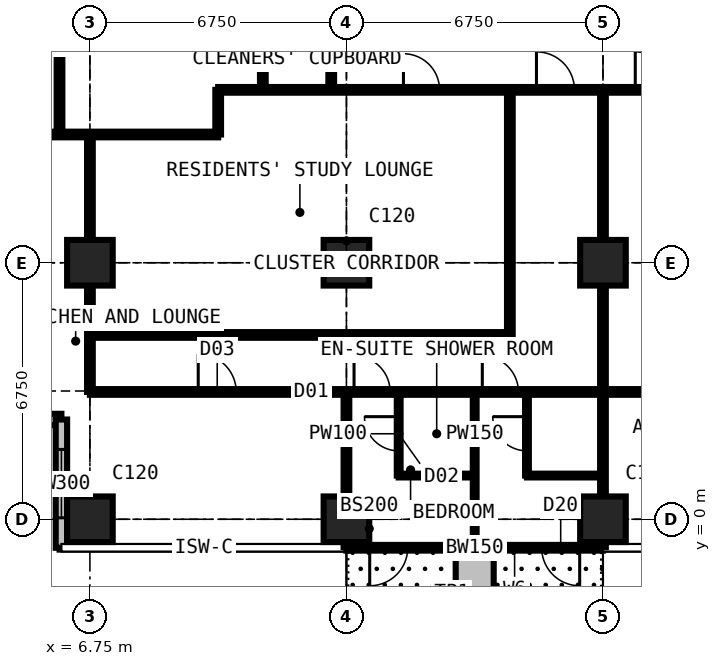
"""IFC4 building model, lengths in metres.
Left out: names, types, materials, properties, quantities, classifications, styles, units other than length and angle.
Written with IfcOpenShell. Run it as: python <this file> out.ifc"""

import sys

from ifc_helpers import new_model, si_unit, direction, frame, frame_2d, origin, origin_2d, place, context, subcontext, project, spatial, rectangle, extrude, element, fill, save


model = new_model("IFC4")
c1 = context("Model", 3, precision=1e-05, world=origin(), true_north=direction((0.0, 1.0)))
c2 = subcontext(c1, "Body", "Model", "MODEL_VIEW")
j1 = project(units=[si_unit("LENGTHUNIT", "METRE"), si_unit("PLANEANGLEUNIT", "RADIAN")], contexts=[c1])
p1 = place(None, origin())
s1 = spatial("IfcSite", under=j1, at=p1, CompositionType="ELEMENT")
p2 = place(p1, origin())
s2 = spatial("IfcBuilding", under=s1, at=p2, CompositionType="ELEMENT")
p3 = place(p2, frame((0.0, 0.0, 192.6)))
s3 = spatial("IfcBuildingStorey", under=s2, at=p3, CompositionType="ELEMENT", Elevation=192.6)
for number, where, z_axis, x_axis in (
    (1, (6.75, 0.0, 0.0), (0.0, 0.0, 1.0), (1.0, 0.0, 0.0)),
    (2, (6.75, 6.75, 0.0), (0.0, 0.0, 1.0), (1.0, 0.0, 0.0)),
    (3, (13.5, 0.0, 0.0), (0.0, 0.0, 1.0), (1.0, 0.0, 0.0)),
    (4, (13.5, 6.75, 0.0), (0.0, 0.0, 1.0), (1.0, 0.0, 0.0)),
    (5, (20.25, 0.0, 0.0), (0.0, 0.0, 1.0), (1.0, 0.0, 0.0)),
    (6, (20.25, 6.75, 0.0), (0.0, 0.0, 1.0), (1.0, 0.0, 0.0)),
):
    element("IfcColumn", number, at=place(p3, frame(where, z_axis=z_axis, x_axis=x_axis)), inside=s3, PredefinedType="COLUMN", context=c2, shape_type="SweptSolid", body=[
        extrude(rectangle(XDim=1.2, YDim=1.2, at=origin_2d()), origin(), (0.0, 0.0, 1.0), 3.6),
    ])
p4 = place(p3, frame((2.625, 2.625, 0.0), z_axis=(0.0, 0.0, 1.0), x_axis=(1.0, 0.0, 0.0)))
e7 = element("IfcWall", 7, at=p4, inside=s3, PredefinedType="SOLIDWALL", context=c2, shape_type="SweptSolid", body=[
    extrude(rectangle(XDim=3.375, YDim=0.3, at=frame_2d((1.688, 0.0))), origin(), (0.0, 0.0, 1.0), 3.375),
])
p5 = place(p4, frame((0.788, 0.0, 0.6)))
e8 = element("IfcOpeningElement", 8, at=p5, cuts=e7, PredefinedType="OPENING", context=c2, shape_type="SweptSolid", body=[
    extrude(rectangle(XDim=1.8, YDim=2.1, at=frame_2d((0.9, 1.05))), frame((0.0, 0.16, 0.0), z_axis=(0.0, -1.0, 0.0), x_axis=(1.0, 0.0, 0.0)), (0.0, 0.0, 1.0), 0.32),
])
p6 = place(p3, frame((6.0, 2.625, 0.0), z_axis=(0.0, 0.0, 1.0), x_axis=(0.0, -1.0, 0.0)))
e9 = element("IfcWall", 9, at=p6, inside=s3, PredefinedType="SOLIDWALL", context=c2, shape_type="SweptSolid", body=[
    extrude(rectangle(XDim=3.375, YDim=0.3, at=frame_2d((1.688, 0.0))), origin(), (0.0, 0.0, 1.0), 3.375),
])
p7 = place(p6, frame((0.788, 0.0, 0.6)))
e10 = element("IfcOpeningElement", 10, at=p7, cuts=e9, PredefinedType="OPENING", context=c2, shape_type="SweptSolid", body=[
    extrude(rectangle(XDim=1.8, YDim=2.1, at=frame_2d((0.9, 1.05))), frame((0.0, 0.16, 0.0), z_axis=(0.0, -1.0, 0.0), x_axis=(1.0, 0.0, 0.0)), (0.0, 0.0, 1.0), 0.32),
])
p8 = place(p3, frame((20.25, -0.75, 0.0), z_axis=(0.0, 0.0, 1.0), x_axis=(-1.0, 0.0, 0.0)))
e11 = element("IfcWall", 11, at=p8, inside=s3, PredefinedType="SOLIDWALL", context=c2, shape_type="SweptSolid", body=[
    extrude(rectangle(XDim=6.75, YDim=0.15, at=frame_2d((3.375, 0.0))), origin(), (0.0, 0.0, 1.0), 3.375),
])
p9 = place(p8, frame((0.613, 0.0, 0.0)))
e12 = element("IfcOpeningElement", 12, at=p9, cuts=e11, PredefinedType="OPENING", context=c2, shape_type="SweptSolid", body=[
    extrude(rectangle(XDim=1.0, YDim=2.2, at=frame_2d((0.5, 1.1))), frame((0.0, 0.085, 0.0), z_axis=(0.0, -1.0, 0.0), x_axis=(1.0, 0.0, 0.0)), (0.0, 0.0, 1.0), 0.17),
])
p10 = place(p8, frame((1.725, 0.0, 0.9)))
e13 = element("IfcOpeningElement", 13, at=p10, cuts=e11, PredefinedType="OPENING", context=c2, shape_type="SweptSolid", body=[
    extrude(rectangle(XDim=1.2, YDim=1.8, at=frame_2d((0.6, 0.9))), frame((0.0, 0.085, 0.0), z_axis=(0.0, -1.0, 0.0), x_axis=(1.0, 0.0, 0.0)), (0.0, 0.0, 1.0), 0.17),
])
p11 = place(p8, frame((5.137, 0.0, 0.0)))
e14 = element("IfcOpeningElement", 14, at=p11, cuts=e11, PredefinedType="OPENING", context=c2, shape_type="SweptSolid", body=[
    extrude(rectangle(XDim=1.0, YDim=2.2, at=frame_2d((0.5, 1.1))), frame((0.0, 0.085, 0.0), z_axis=(0.0, -1.0, 0.0), x_axis=(1.0, 0.0, 0.0)), (0.0, 0.0, 1.0), 0.17),
])
p12 = place(p8, frame((3.825, 0.0, 0.9)))
e15 = element("IfcOpeningElement", 15, at=p12, cuts=e11, PredefinedType="OPENING", context=c2, shape_type="SweptSolid", body=[
    extrude(rectangle(XDim=1.2, YDim=1.8, at=frame_2d((0.6, 0.9))), frame((0.0, 0.085, 0.0), z_axis=(0.0, -1.0, 0.0), x_axis=(1.0, 0.0, 0.0)), (0.0, 0.0, 1.0), 0.17),
])
p13 = place(p3, frame((16.875, -0.85, 0.0), z_axis=(0.0, 0.0, 1.0), x_axis=(0.0, -1.0, 0.0)))
e16 = element("IfcWall", 16, at=p13, inside=s3, PredefinedType="USERDEFINED", context=c2, shape_type="SweptSolid", body=[
    extrude(rectangle(XDim=2.2, YDim=1.0, at=frame_2d((1.1, 0.0))), origin(), (0.0, 0.0, 1.0), 0.9),
])
p14 = place(p3, frame((-0.734, 10.125, 0.0), z_axis=(0.0, 0.0, 1.0), x_axis=(1.0, 0.0, 0.0)))
e17 = element("IfcWall", 17, at=p14, inside=s3, PredefinedType="PARTITIONING", context=c2, shape_type="SweptSolid", body=[
    extrude(rectangle(XDim=10.859, YDim=0.15, at=frame_2d((5.429, 0.0))), origin(), (0.0, 0.0, 1.0), 3.375),
])
p15 = place(p3, frame((5.95, 10.125, 0.0), z_axis=(0.0, 0.0, 1.0), x_axis=(0.0, 1.0, 0.0)))
e18 = element("IfcWall", 18, at=p15, inside=s3, PredefinedType="PARTITIONING", context=c2, shape_type="SweptSolid", body=[
    extrude(rectangle(XDim=2.65, YDim=0.15, at=frame_2d((1.325, 0.0))), origin(), (0.0, 0.0, 1.0), 3.375),
])
p16 = place(p3, frame((6.75, 3.35, 0.0), z_axis=(0.0, 0.0, 1.0), x_axis=(0.0, 1.0, 0.0)))
e19 = element("IfcWall", 19, at=p16, inside=s3, PredefinedType="PARTITIONING", context=c2, shape_type="SweptSolid", body=[
    extrude(rectangle(XDim=6.775, YDim=0.15, at=frame_2d((3.387, 0.0))), origin(), (0.0, 0.0, 1.0), 2.877),
])
p17 = place(p3, frame((6.75, 3.35, 0.0), z_axis=(0.0, 0.0, 1.0), x_axis=(1.0, 0.0, 0.0)))
e20 = element("IfcWall", 20, at=p17, inside=s3, PredefinedType="PARTITIONING", context=c2, shape_type="SweptSolid", body=[
    extrude(rectangle(XDim=20.25, YDim=0.15, at=frame_2d((10.125, 0.0))), origin(), (0.0, 0.0, 1.0), 3.375),
])
p18 = place(p17, frame((2.85, 0.0, 0.0)))
e21 = element("IfcOpeningElement", 21, at=p18, cuts=e20, PredefinedType="OPENING", context=c2, shape_type="SweptSolid", body=[
    extrude(rectangle(XDim=1.0, YDim=2.2, at=frame_2d((0.5, 1.1))), frame((0.0, 0.085, 0.0), z_axis=(0.0, -1.0, 0.0), x_axis=(1.0, 0.0, 0.0)), (0.0, 0.0, 1.0), 0.17),
])
p19 = place(p17, frame((6.95, 0.0, 0.0)))
e22 = element("IfcOpeningElement", 22, at=p19, cuts=e20, PredefinedType="OPENING", context=c2, shape_type="SweptSolid", body=[
    extrude(rectangle(XDim=0.95, YDim=2.2, at=frame_2d((0.475, 1.1))), frame((0.0, 0.085, 0.0), z_axis=(0.0, -1.0, 0.0), x_axis=(1.0, 0.0, 0.0)), (0.0, 0.0, 1.0), 0.17),
])
p20 = place(p17, frame((10.325, 0.0, 0.0)))
e23 = element("IfcOpeningElement", 23, at=p20, cuts=e20, PredefinedType="OPENING", context=c2, shape_type="SweptSolid", body=[
    extrude(rectangle(XDim=0.95, YDim=2.2, at=frame_2d((0.475, 1.1))), frame((0.0, 0.085, 0.0), z_axis=(0.0, -1.0, 0.0), x_axis=(1.0, 0.0, 0.0)), (0.0, 0.0, 1.0), 0.17),
])
p21 = place(p17, frame((15.1, 0.0, 0.0)))
e24 = element("IfcOpeningElement", 24, at=p21, cuts=e20, PredefinedType="OPENING", context=c2, shape_type="SweptSolid", body=[
    extrude(rectangle(XDim=0.95, YDim=2.2, at=frame_2d((0.475, 1.1))), frame((0.0, 0.085, 0.0), z_axis=(0.0, -1.0, 0.0), x_axis=(1.0, 0.0, 0.0)), (0.0, 0.0, 1.0), 0.17),
])
p22 = place(p3, frame((6.75, 4.85, 0.0), z_axis=(0.0, 0.0, 1.0), x_axis=(1.0, 0.0, 0.0)))
e25 = element("IfcWall", 25, at=p22, inside=s3, PredefinedType="PARTITIONING", context=c2, shape_type="SweptSolid", body=[
    extrude(rectangle(XDim=11.05, YDim=0.15, at=frame_2d((5.525, 0.0))), origin(), (0.0, 0.0, 1.0), 3.375),
])
p23 = place(p3, frame((10.125, 10.125, 0.0), z_axis=(0.0, 0.0, 1.0), x_axis=(0.0, 1.0, 0.0)))
e26 = element("IfcWall", 26, at=p23, inside=s3, PredefinedType="PARTITIONING", context=c2, shape_type="SweptSolid", body=[
    extrude(rectangle(XDim=1.175, YDim=0.15, at=frame_2d((0.587, 0.0))), origin(), (0.0, 0.0, 1.0), 3.375),
])
p24 = place(p3, frame((10.125, 11.3, 0.0), z_axis=(0.0, 0.0, 1.0), x_axis=(1.0, 0.0, 0.0)))
e27 = element("IfcWall", 27, at=p24, inside=s3, PredefinedType="PARTITIONING", context=c2, shape_type="SweptSolid", body=[
    extrude(rectangle(XDim=20.25, YDim=0.15, at=frame_2d((10.125, 0.0))), origin(), (0.0, 0.0, 1.0), 3.375),
])
p25 = place(p24, frame((8.375, 0.0, 0.0)))
e28 = element("IfcOpeningElement", 28, at=p25, cuts=e27, PredefinedType="OPENING", context=c2, shape_type="SweptSolid", body=[
    extrude(rectangle(XDim=1.0, YDim=2.2, at=frame_2d((0.5, 1.1))), frame((0.0, 0.085, 0.0), z_axis=(0.0, -1.0, 0.0), x_axis=(1.0, 0.0, 0.0)), (0.0, 0.0, 1.0), 0.17),
])
p26 = place(p24, frame((10.975, 0.0, 0.0)))
e29 = element("IfcOpeningElement", 29, at=p26, cuts=e27, PredefinedType="OPENING", context=c2, shape_type="SweptSolid", body=[
    extrude(rectangle(XDim=1.0, YDim=2.2, at=frame_2d((0.5, 1.1))), frame((0.0, 0.085, 0.0), z_axis=(0.0, -1.0, 0.0), x_axis=(1.0, 0.0, 0.0)), (0.0, 0.0, 1.0), 0.17),
])
p27 = place(p24, frame((4.875, 0.0, 0.0)))
e30 = element("IfcOpeningElement", 30, at=p27, cuts=e27, PredefinedType="OPENING", context=c2, shape_type="SweptSolid", body=[
    extrude(rectangle(XDim=0.95, YDim=2.2, at=frame_2d((0.475, 1.1))), frame((0.0, 0.085, 0.0), z_axis=(0.0, -1.0, 0.0), x_axis=(1.0, 0.0, 0.0)), (0.0, 0.0, 1.0), 0.17),
])
p28 = place(p3, frame((11.3, 11.3, 0.0), z_axis=(0.0, 0.0, 1.0), x_axis=(0.0, 1.0, 0.0)))
e31 = element("IfcWall", 31, at=p28, inside=s3, PredefinedType="PARTITIONING", context=c2, shape_type="SweptSolid", body=[
    extrude(rectangle(XDim=19.3, YDim=0.15, at=frame_2d((9.65, 0.0))), origin(), (0.0, 0.0, 1.0), 3.375),
])
p29 = place(p28, frame((18.1, 0.0, 0.0)))
e32 = element("IfcOpeningElement", 32, at=p29, cuts=e31, PredefinedType="OPENING", context=c2, shape_type="SweptSolid", body=[
    extrude(rectangle(XDim=1.0, YDim=2.2, at=frame_2d((0.5, 1.1))), frame((0.0, 0.085, 0.0), z_axis=(0.0, -1.0, 0.0), x_axis=(1.0, 0.0, 0.0)), (0.0, 0.0, 1.0), 0.17),
])
p30 = place(p28, frame((10.137, 0.0, 0.0)))
e33 = element("IfcOpeningElement", 33, at=p30, cuts=e31, PredefinedType="OPENING", context=c2, shape_type="SweptSolid", body=[
    extrude(rectangle(XDim=1.0, YDim=2.2, at=frame_2d((0.5, 1.1))), frame((0.0, 0.085, 0.0), z_axis=(0.0, -1.0, 0.0), x_axis=(1.0, 0.0, 0.0)), (0.0, 0.0, 1.0), 0.17),
])
p31 = place(p3, frame((13.1, 11.3, 0.0), z_axis=(0.0, 0.0, 1.0), x_axis=(0.0, 1.0, 0.0)))
e34 = element("IfcWall", 34, at=p31, inside=s3, PredefinedType="PARTITIONING", context=c2, shape_type="SweptSolid", body=[
    extrude(rectangle(XDim=1.6, YDim=0.15, at=frame_2d((0.8, 0.0))), origin(), (0.0, 0.0, 1.0), 3.375),
])
p32 = place(p3, frame((13.5, -0.734, 0.0), z_axis=(0.0, 0.0, 1.0), x_axis=(0.0, 1.0, 0.0)))
e35 = element("IfcWall", 35, at=p32, inside=s3, PredefinedType="PARTITIONING", context=c2, shape_type="SweptSolid", body=[
    extrude(rectangle(XDim=4.084, YDim=0.15, at=frame_2d((2.042, 0.0))), origin(), (0.0, 0.0, 1.0), 2.877),
])
p33 = place(p3, frame((14.875, 1.15, 0.0), z_axis=(0.0, 0.0, 1.0), x_axis=(0.0, 1.0, 0.0)))
e36 = element("IfcWall", 36, at=p33, inside=s3, PredefinedType="PARTITIONING", context=c2, shape_type="SweptSolid", body=[
    extrude(rectangle(XDim=2.2, YDim=0.1, at=frame_2d((1.1, 0.0))), origin(), (0.0, 0.0, 1.0), 3.375),
])
p34 = place(p33, frame((0.65, 0.0, 0.0)))
e37 = element("IfcOpeningElement", 37, at=p34, cuts=e36, PredefinedType="OPENING", context=c2, shape_type="SweptSolid", body=[
    extrude(rectangle(XDim=0.9, YDim=2.2, at=frame_2d((0.45, 1.1))), frame((0.0, 0.06, 0.0), z_axis=(0.0, -1.0, 0.0), x_axis=(1.0, 0.0, 0.0)), (0.0, 0.0, 1.0), 0.12),
])
p35 = place(p3, frame((14.875, 1.15, 0.0), z_axis=(0.0, 0.0, 1.0), x_axis=(1.0, 0.0, 0.0)))
e38 = element("IfcWall", 38, at=p35, inside=s3, PredefinedType="PARTITIONING", context=c2, shape_type="SweptSolid", body=[
    extrude(rectangle(XDim=2.0, YDim=0.1, at=frame_2d((1.0, 0.0))), origin(), (0.0, 0.0, 1.0), 3.375),
])
p36 = place(p3, frame((16.875, -0.734, 0.0), z_axis=(0.0, 0.0, 1.0), x_axis=(0.0, 1.0, 0.0)))
e39 = element("IfcWall", 39, at=p36, inside=s3, PredefinedType="PARTITIONING", context=c2, shape_type="SweptSolid", body=[
    extrude(rectangle(XDim=4.084, YDim=0.1, at=frame_2d((2.042, 0.0))), origin(), (0.0, 0.0, 1.0), 3.375),
])
p37 = place(p3, frame((17.8, 4.85, 0.0), z_axis=(0.0, 0.0, 1.0), x_axis=(0.0, 1.0, 0.0)))
e40 = element("IfcWall", 40, at=p37, inside=s3, PredefinedType="PARTITIONING", context=c2, shape_type="SweptSolid", body=[
    extrude(rectangle(XDim=6.45, YDim=0.15, at=frame_2d((3.225, 0.0))), origin(), (0.0, 0.0, 1.0), 3.375),
])
p38 = place(p3, frame((18.25, 1.15, 0.0), z_axis=(0.0, 0.0, 1.0), x_axis=(0.0, 1.0, 0.0)))
e41 = element("IfcWall", 41, at=p38, inside=s3, PredefinedType="PARTITIONING", context=c2, shape_type="SweptSolid", body=[
    extrude(rectangle(XDim=2.2, YDim=0.1, at=frame_2d((1.1, 0.0))), origin(), (0.0, 0.0, 1.0), 3.375),
])
p39 = place(p38, frame((0.65, 0.0, 0.0)))
e42 = element("IfcOpeningElement", 42, at=p39, cuts=e41, PredefinedType="OPENING", context=c2, shape_type="SweptSolid", body=[
    extrude(rectangle(XDim=0.9, YDim=2.2, at=frame_2d((0.45, 1.1))), frame((0.0, 0.06, 0.0), z_axis=(0.0, -1.0, 0.0), x_axis=(1.0, 0.0, 0.0)), (0.0, 0.0, 1.0), 0.12),
])
p40 = place(p3, frame((18.25, 1.15, 0.0), z_axis=(0.0, 0.0, 1.0), x_axis=(1.0, 0.0, 0.0)))
e43 = element("IfcWall", 43, at=p40, inside=s3, PredefinedType="PARTITIONING", context=c2, shape_type="SweptSolid", body=[
    extrude(rectangle(XDim=2.0, YDim=0.1, at=frame_2d((1.0, 0.0))), origin(), (0.0, 0.0, 1.0), 3.375),
])
p41 = place(p3, frame((20.25, -0.734, 0.0), z_axis=(0.0, 0.0, 1.0), x_axis=(0.0, 1.0, 0.0)))
e44 = element("IfcWall", 44, at=p41, inside=s3, PredefinedType="PARTITIONING", context=c2, shape_type="SweptSolid", body=[
    extrude(rectangle(XDim=12.034, YDim=0.15, at=frame_2d((6.017, 0.0))), origin(), (0.0, 0.0, 1.0), 2.806),
])
p42 = place(p7, origin())
e45 = element("IfcWindow", 45, at=p42, inside=s3, PartitioningType="SINGLE_PANEL", PredefinedType="WINDOW", context=c2, shape_type="SweptSolid", body=[
    extrude(rectangle(XDim=1.8, YDim=2.1, at=frame_2d((0.9, 1.05))), frame((0.0, 0.03, 0.0), z_axis=(0.0, -1.0, 0.0), x_axis=(1.0, 0.0, 0.0)), (0.0, 0.0, 1.0), 0.06),
])
fill(e10, e45)
p43 = place(p9, origin())
e46 = element("IfcDoor", 46, at=p43, inside=s3, OperationType="SINGLE_SWING_LEFT", PredefinedType="DOOR", context=c2, shape_type="SweptSolid", body=[
    extrude(rectangle(XDim=1.0, YDim=2.2, at=frame_2d((0.5, 1.1))), frame((0.0, 0.025, 0.0), z_axis=(0.0, -1.0, 0.0), x_axis=(1.0, 0.0, 0.0)), (0.0, 0.0, 1.0), 0.05),
])
fill(e12, e46)
p44 = place(p10, origin())
e47 = element("IfcWindow", 47, at=p44, inside=s3, PartitioningType="SINGLE_PANEL", PredefinedType="WINDOW", context=c2, shape_type="SweptSolid", body=[
    extrude(rectangle(XDim=1.2, YDim=1.8, at=frame_2d((0.6, 0.9))), frame((0.0, 0.03, 0.0), z_axis=(0.0, -1.0, 0.0), x_axis=(1.0, 0.0, 0.0)), (0.0, 0.0, 1.0), 0.06),
])
fill(e13, e47)
p45 = place(p11, origin())
e48 = element("IfcDoor", 48, at=p45, inside=s3, OperationType="SINGLE_SWING_RIGHT", PredefinedType="DOOR", context=c2, shape_type="SweptSolid", body=[
    extrude(rectangle(XDim=1.0, YDim=2.2, at=frame_2d((0.5, 1.1))), frame((0.0, 0.025, 0.0), z_axis=(0.0, -1.0, 0.0), x_axis=(1.0, 0.0, 0.0)), (0.0, 0.0, 1.0), 0.05),
])
fill(e14, e48)
p46 = place(p12, origin())
e49 = element("IfcWindow", 49, at=p46, inside=s3, PartitioningType="SINGLE_PANEL", PredefinedType="WINDOW", context=c2, shape_type="SweptSolid", body=[
    extrude(rectangle(XDim=1.2, YDim=1.8, at=frame_2d((0.6, 0.9))), frame((0.0, 0.03, 0.0), z_axis=(0.0, -1.0, 0.0), x_axis=(1.0, 0.0, 0.0)), (0.0, 0.0, 1.0), 0.06),
])
fill(e15, e49)
p47 = place(p18, origin())
e50 = element("IfcDoor", 50, at=p47, inside=s3, OperationType="SINGLE_SWING_LEFT", PredefinedType="DOOR", context=c2, shape_type="SweptSolid", body=[
    extrude(rectangle(XDim=1.0, YDim=2.2, at=frame_2d((0.5, 1.1))), frame((0.0, 0.025, 0.0), z_axis=(0.0, -1.0, 0.0), x_axis=(1.0, 0.0, 0.0)), (0.0, 0.0, 1.0), 0.05),
])
fill(e21, e50)
p48 = place(p19, origin())
e51 = element("IfcDoor", 51, at=p48, inside=s3, OperationType="SINGLE_SWING_LEFT", PredefinedType="DOOR", context=c2, shape_type="SweptSolid", body=[
    extrude(rectangle(XDim=0.95, YDim=2.2, at=frame_2d((0.475, 1.1))), frame((0.0, 0.025, 0.0), z_axis=(0.0, -1.0, 0.0), x_axis=(1.0, 0.0, 0.0)), (0.0, 0.0, 1.0), 0.05),
])
fill(e22, e51)
p49 = place(p34, origin())
e52 = element("IfcDoor", 52, at=p49, inside=s3, OperationType="SINGLE_SWING_RIGHT", PredefinedType="DOOR", context=c2, shape_type="SweptSolid", body=[
    extrude(rectangle(XDim=0.9, YDim=2.2, at=frame_2d((0.45, 1.1))), frame((0.0, 0.025, 0.0), z_axis=(0.0, -1.0, 0.0), x_axis=(1.0, 0.0, 0.0)), (0.0, 0.0, 1.0), 0.05),
])
fill(e37, e52)
p50 = place(p20, origin())
e53 = element("IfcDoor", 53, at=p50, inside=s3, OperationType="SINGLE_SWING_LEFT", PredefinedType="DOOR", context=c2, shape_type="SweptSolid", body=[
    extrude(rectangle(XDim=0.95, YDim=2.2, at=frame_2d((0.475, 1.1))), frame((0.0, 0.025, 0.0), z_axis=(0.0, -1.0, 0.0), x_axis=(1.0, 0.0, 0.0)), (0.0, 0.0, 1.0), 0.05),
])
fill(e23, e53)
p51 = place(p39, origin())
e54 = element("IfcDoor", 54, at=p51, inside=s3, OperationType="SINGLE_SWING_RIGHT", PredefinedType="DOOR", context=c2, shape_type="SweptSolid", body=[
    extrude(rectangle(XDim=0.9, YDim=2.2, at=frame_2d((0.45, 1.1))), frame((0.0, 0.025, 0.0), z_axis=(0.0, -1.0, 0.0), x_axis=(1.0, 0.0, 0.0)), (0.0, 0.0, 1.0), 0.05),
])
fill(e42, e54)
p52 = place(p25, origin())
e55 = element("IfcDoor", 55, at=p52, inside=s3, OperationType="SINGLE_SWING_LEFT", PredefinedType="DOOR", context=c2, shape_type="SweptSolid", body=[
    extrude(rectangle(XDim=1.0, YDim=2.2, at=frame_2d((0.5, 1.1))), frame((0.0, 0.025, 0.0), z_axis=(0.0, -1.0, 0.0), x_axis=(1.0, 0.0, 0.0)), (0.0, 0.0, 1.0), 0.05),
])
fill(e28, e55)
p53 = place(p26, origin())
e56 = element("IfcDoor", 56, at=p53, inside=s3, OperationType="SINGLE_SWING_LEFT", PredefinedType="DOOR", context=c2, shape_type="SweptSolid", body=[
    extrude(rectangle(XDim=1.0, YDim=2.2, at=frame_2d((0.5, 1.1))), frame((0.0, 0.025, 0.0), z_axis=(0.0, -1.0, 0.0), x_axis=(1.0, 0.0, 0.0)), (0.0, 0.0, 1.0), 0.05),
])
fill(e29, e56)
p54 = place(p27, origin())
e57 = element("IfcDoor", 57, at=p54, inside=s3, OperationType="SINGLE_SWING_LEFT", PredefinedType="DOOR", context=c2, shape_type="SweptSolid", body=[
    extrude(rectangle(XDim=0.95, YDim=2.2, at=frame_2d((0.475, 1.1))), frame((0.0, 0.025, 0.0), z_axis=(0.0, -1.0, 0.0), x_axis=(1.0, 0.0, 0.0)), (0.0, 0.0, 1.0), 0.05),
])
fill(e30, e57)
save(model, sys.argv[1])
